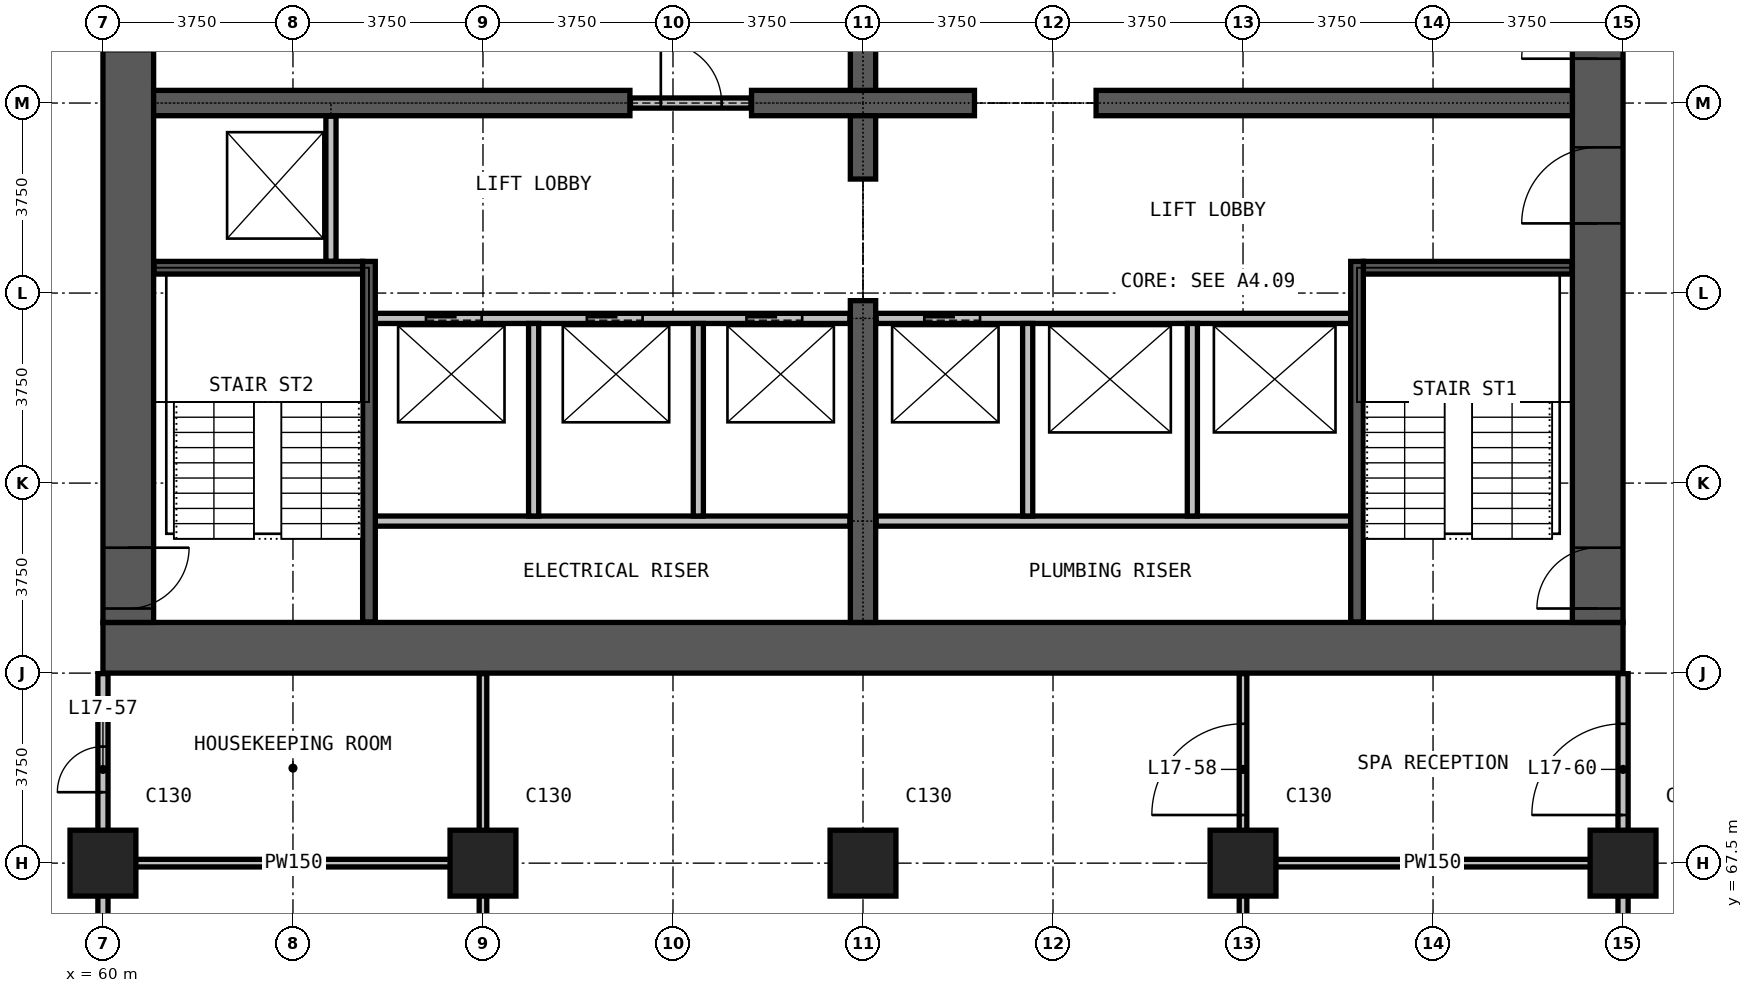
"""IFC4 building model, lengths in metres.
Left out: names, types, materials, properties, quantities, classifications, styles, units other than length and angle.
Written with IfcOpenShell. Run it as: python <this file> out.ifc"""

import sys

from ifc_helpers import new_model, si_unit, direction, frame, frame_2d, origin, origin_2d, place, context, subcontext, project, spatial, rectangle, extrude, element, fill, save


model = new_model("IFC4")
c1 = context("Model", 3, precision=1e-05, world=origin(), true_north=direction((0.0, 1.0)))
c2 = subcontext(c1, "Body", "Model", "MODEL_VIEW")
j1 = project(units=[si_unit("LENGTHUNIT", "METRE"), si_unit("PLANEANGLEUNIT", "RADIAN")], contexts=[c1])
p1 = place(None, origin())
s1 = spatial("IfcSite", under=j1, at=p1, CompositionType="ELEMENT")
p2 = place(p1, origin())
s2 = spatial("IfcBuilding", under=s1, at=p2, CompositionType="ELEMENT")
p3 = place(p2, frame((0.0, 0.0, 75.8)))
s3 = spatial("IfcBuildingStorey", under=s2, at=p3, CompositionType="ELEMENT", Elevation=75.8)
for number, where, z_axis, x_axis in (
    (1, (60.0, 67.5, 0.0), (0.0, 0.0, 1.0), (1.0, 0.0, 0.0)),
    (2, (67.5, 67.5, 0.0), (0.0, 0.0, 1.0), (1.0, 0.0, 0.0)),
    (3, (75.0, 67.5, 0.0), (0.0, 0.0, 1.0), (1.0, 0.0, 0.0)),
    (4, (82.5, 67.5, 0.0), (0.0, 0.0, 1.0), (1.0, 0.0, 0.0)),
    (5, (90.0, 67.5, 0.0), (0.0, 0.0, 1.0), (1.0, 0.0, 0.0)),
):
    element("IfcColumn", number, at=place(p3, frame(where, z_axis=z_axis, x_axis=x_axis)), inside=s3, PredefinedType="COLUMN", context=c2, shape_type="SweptSolid", body=[
        extrude(rectangle(XDim=1.3, YDim=1.3, at=origin_2d()), origin(), (0.0, 0.0, 1.0), 3.3),
    ])
p4 = place(p3, frame((60.0, 71.75, 0.0), z_axis=(0.0, 0.0, 1.0), x_axis=(1.0, 0.0, 0.0)))
e6 = element("IfcWall", 6, at=p4, inside=s3, PredefinedType="SHEAR", context=c2, shape_type="SweptSolid", body=[
    extrude(rectangle(XDim=30.0, YDim=1.0, at=frame_2d((15.0, 0.0))), origin(), (0.0, 0.0, 1.0), 3.3),
])
p5 = place(p3, frame((89.5, 72.25, 0.0), z_axis=(0.0, 0.0, 1.0), x_axis=(0.0, 1.0, 0.0)))
e7 = element("IfcWall", 7, at=p5, inside=s3, PredefinedType="SHEAR", context=c2, shape_type="SweptSolid", body=[
    extrude(rectangle(XDim=20.5, YDim=1.0, at=frame_2d((10.25, 0.0))), origin(), (0.0, 0.0, 1.0), 3.3),
])
p6 = place(p5, frame((0.275, 0.0, 0.0)))
e8 = element("IfcOpeningElement", 8, at=p6, cuts=e7, PredefinedType="OPENING", context=c2, shape_type="SweptSolid", body=[
    extrude(rectangle(XDim=1.2, YDim=2.2, at=frame_2d((0.6, 1.1))), frame((0.0, 0.51, 0.0), z_axis=(0.0, -1.0, 0.0), x_axis=(1.0, 0.0, 0.0)), (0.0, 0.0, 1.0), 1.02),
])
p7 = place(p5, frame((13.775, 0.0, 0.0)))
e9 = element("IfcOpeningElement", 9, at=p7, cuts=e7, PredefinedType="OPENING", context=c2, shape_type="SweptSolid", body=[
    extrude(rectangle(XDim=1.2, YDim=2.2, at=frame_2d((0.6, 1.1))), frame((0.0, 0.51, 0.0), z_axis=(0.0, -1.0, 0.0), x_axis=(1.0, 0.0, 0.0)), (0.0, 0.0, 1.0), 1.02),
])
p8 = place(p5, frame((7.875, 0.0, 0.0)))
e10 = element("IfcOpeningElement", 10, at=p8, cuts=e7, PredefinedType="OPENING", context=c2, shape_type="SweptSolid", body=[
    extrude(rectangle(XDim=1.5, YDim=2.2, at=frame_2d((0.75, 1.1))), frame((0.0, 0.51, 0.0), z_axis=(0.0, -1.0, 0.0), x_axis=(1.0, 0.0, 0.0)), (0.0, 0.0, 1.0), 1.02),
])
p9 = place(p5, frame((11.125, 0.0, 0.0)))
e11 = element("IfcOpeningElement", 11, at=p9, cuts=e7, PredefinedType="OPENING", context=c2, shape_type="SweptSolid", body=[
    extrude(rectangle(XDim=1.5, YDim=2.2, at=frame_2d((0.75, 1.1))), frame((0.0, 0.51, 0.0), z_axis=(0.0, -1.0, 0.0), x_axis=(1.0, 0.0, 0.0)), (0.0, 0.0, 1.0), 1.02),
])
p10 = place(p3, frame((60.5, 92.75, 0.0), z_axis=(0.0, 0.0, 1.0), x_axis=(0.0, -1.0, 0.0)))
e12 = element("IfcWall", 12, at=p10, inside=s3, PredefinedType="SHEAR", context=c2, shape_type="SweptSolid", body=[
    extrude(rectangle(XDim=20.5, YDim=1.0, at=frame_2d((10.25, 0.0))), origin(), (0.0, 0.0, 1.0), 3.3),
])
p11 = place(p10, frame((19.025, 0.0, 0.0)))
e13 = element("IfcOpeningElement", 13, at=p11, cuts=e12, PredefinedType="OPENING", context=c2, shape_type="SweptSolid", body=[
    extrude(rectangle(XDim=1.2, YDim=2.2, at=frame_2d((0.6, 1.1))), frame((0.0, 0.51, 0.0), z_axis=(0.0, -1.0, 0.0), x_axis=(1.0, 0.0, 0.0)), (0.0, 0.0, 1.0), 1.02),
])
p12 = place(p10, frame((8.025, 0.0, 0.0)))
e14 = element("IfcOpeningElement", 14, at=p12, cuts=e12, PredefinedType="OPENING", context=c2, shape_type="SweptSolid", body=[
    extrude(rectangle(XDim=1.2, YDim=2.2, at=frame_2d((0.6, 1.1))), frame((0.0, 0.51, 0.0), z_axis=(0.0, -1.0, 0.0), x_axis=(1.0, 0.0, 0.0)), (0.0, 0.0, 1.0), 1.02),
])
p13 = place(p3, frame((61.0, 82.5, 0.0), z_axis=(0.0, 0.0, 1.0), x_axis=(1.0, 0.0, 0.0)))
e15 = element("IfcWall", 15, at=p13, inside=s3, PredefinedType="SHEAR", context=c2, shape_type="SweptSolid", body=[
    extrude(rectangle(XDim=9.4, YDim=0.5, at=frame_2d((4.7, 0.0))), origin(), (0.0, 0.0, 1.0), 3.3),
])
p14 = place(p3, frame((72.8, 82.5, 0.0), z_axis=(0.0, 0.0, 1.0), x_axis=(1.0, 0.0, 0.0)))
e16 = element("IfcWall", 16, at=p14, inside=s3, PredefinedType="SHEAR", context=c2, shape_type="SweptSolid", body=[
    extrude(rectangle(XDim=4.4, YDim=0.5, at=frame_2d((2.2, 0.0))), origin(), (0.0, 0.0, 1.0), 3.3),
])
p15 = place(p3, frame((79.6, 82.5, 0.0), z_axis=(0.0, 0.0, 1.0), x_axis=(1.0, 0.0, 0.0)))
e17 = element("IfcWall", 17, at=p15, inside=s3, PredefinedType="SHEAR", context=c2, shape_type="SweptSolid", body=[
    extrude(rectangle(XDim=9.4, YDim=0.5, at=frame_2d((4.7, 0.0))), origin(), (0.0, 0.0, 1.0), 3.3),
])
p16 = place(p3, frame((75.0, 72.25, 0.0), z_axis=(0.0, 0.0, 1.0), x_axis=(0.0, 1.0, 0.0)))
e18 = element("IfcWall", 18, at=p16, inside=s3, PredefinedType="SHEAR", context=c2, shape_type="SweptSolid", body=[
    extrude(rectangle(XDim=6.35, YDim=0.5, at=frame_2d((3.175, 0.0))), origin(), (0.0, 0.0, 1.0), 3.3),
])
for number, where, z_axis, x_axis in (
    (19, (75.0, 81.0, 0.0), (0.0, 0.0, 1.0), (0.0, 1.0, 0.0)),
    (20, (75.0, 82.75, 0.0), (0.0, 0.0, 1.0), (0.0, 1.0, 0.0)),
):
    element("IfcWall", number, at=place(p3, frame(where, z_axis=z_axis, x_axis=x_axis)), inside=s3, PredefinedType="SHEAR", context=c2, shape_type="SweptSolid", body=[
        extrude(rectangle(XDim=1.25, YDim=0.5, at=frame_2d((0.625, 0.0))), origin(), (0.0, 0.0, 1.0), 3.3),
    ])
p17 = place(p3, frame((70.41, 82.5, 0.0), z_axis=(0.0, 0.0, 1.0), x_axis=(1.0, 0.0, 0.0)))
e21 = element("IfcWall", 21, at=p17, inside=s3, PredefinedType="PARTITIONING", context=c2, shape_type="SweptSolid", body=[
    extrude(rectangle(XDim=2.38, YDim=0.2, at=frame_2d((1.19, 0.0))), origin(), (0.0, 0.0, 1.0), 2.4),
])
p18 = place(p17, frame((0.6, 0.0, 0.0)))
e22 = element("IfcOpeningElement", 22, at=p18, cuts=e21, PredefinedType="OPENING", context=c2, shape_type="SweptSolid", body=[
    extrude(rectangle(XDim=1.2, YDim=2.2, at=frame_2d((0.6, 1.1))), frame((0.0, 0.11, 0.0), z_axis=(0.0, -1.0, 0.0), x_axis=(1.0, 0.0, 0.0)), (0.0, 0.0, 1.0), 0.22),
])
p19 = place(p3, frame((60.0, 52.4, 0.0), z_axis=(0.0, 0.0, 1.0), x_axis=(0.0, 1.0, 0.0)))
e23 = element("IfcWall", 23, at=p19, inside=s3, PredefinedType="PARTITIONING", context=c2, shape_type="SweptSolid", body=[
    extrude(rectangle(XDim=18.84, YDim=0.2, at=frame_2d((9.42, 0.0))), origin(), (0.0, 0.0, 1.0), 3.0),
])
p20 = place(p19, frame((10.9, 0.0, 0.0)))
e24 = element("IfcOpeningElement", 24, at=p20, cuts=e23, PredefinedType="OPENING", context=c2, shape_type="SweptSolid", body=[
    extrude(rectangle(XDim=0.9, YDim=2.2, at=frame_2d((0.45, 1.1))), frame((0.0, 0.11, 0.0), z_axis=(0.0, -1.0, 0.0), x_axis=(1.0, 0.0, 0.0)), (0.0, 0.0, 1.0), 0.22),
])
p21 = place(p19, frame((16.5, 0.0, 0.0)))
e25 = element("IfcOpeningElement", 25, at=p21, cuts=e23, PredefinedType="OPENING", context=c2, shape_type="SweptSolid", body=[
    extrude(rectangle(XDim=0.9, YDim=2.2, at=frame_2d((0.45, 1.1))), frame((0.0, 0.11, 0.0), z_axis=(0.0, -1.0, 0.0), x_axis=(1.0, 0.0, 0.0)), (0.0, 0.0, 1.0), 0.22),
])
p22 = place(p3, frame((90.0, 52.4, 0.0), z_axis=(0.0, 0.0, 1.0), x_axis=(0.0, 1.0, 0.0)))
e26 = element("IfcWall", 26, at=p22, inside=s3, PredefinedType="PARTITIONING", context=c2, shape_type="SweptSolid", body=[
    extrude(rectangle(XDim=18.84, YDim=0.2, at=frame_2d((9.42, 0.0))), origin(), (0.0, 0.0, 1.0), 3.0),
])
p23 = place(p22, frame((3.35, 0.0, 0.0)))
e27 = element("IfcOpeningElement", 27, at=p23, cuts=e26, PredefinedType="OPENING", context=c2, shape_type="SweptSolid", body=[
    extrude(rectangle(XDim=1.0, YDim=2.2, at=frame_2d((0.5, 1.1))), frame((0.0, 0.11, 0.0), z_axis=(0.0, -1.0, 0.0), x_axis=(1.0, 0.0, 0.0)), (0.0, 0.0, 1.0), 0.22),
])
p24 = place(p22, frame((10.85, 0.0, 0.0)))
e28 = element("IfcOpeningElement", 28, at=p24, cuts=e26, PredefinedType="OPENING", context=c2, shape_type="SweptSolid", body=[
    extrude(rectangle(XDim=1.0, YDim=2.2, at=frame_2d((0.5, 1.1))), frame((0.0, 0.11, 0.0), z_axis=(0.0, -1.0, 0.0), x_axis=(1.0, 0.0, 0.0)), (0.0, 0.0, 1.0), 0.22),
])
p25 = place(p22, frame((16.05, 0.0, 0.0)))
e29 = element("IfcOpeningElement", 29, at=p25, cuts=e26, PredefinedType="OPENING", context=c2, shape_type="SweptSolid", body=[
    extrude(rectangle(XDim=1.8, YDim=2.2, at=frame_2d((0.9, 1.1))), frame((0.0, 0.11, 0.0), z_axis=(0.0, -1.0, 0.0), x_axis=(1.0, 0.0, 0.0)), (0.0, 0.0, 1.0), 0.22),
])
for number, where, z_axis, x_axis in (
    (30, (60.1, 67.5, 0.0), (0.0, 0.0, 1.0), (1.0, 0.0, 0.0)),
    (31, (82.575, 67.5, 0.0), (0.0, 0.0, 1.0), (1.0, 0.0, 0.0)),
):
    element("IfcWall", number, at=place(p3, frame(where, z_axis=z_axis, x_axis=x_axis)), inside=s3, PredefinedType="PARTITIONING", context=c2, shape_type="SweptSolid", body=[
        extrude(rectangle(XDim=7.325, YDim=0.15, at=frame_2d((3.663, 0.0))), origin(), (0.0, 0.0, 1.0), 3.0),
    ])
p26 = place(p3, frame((67.5, 60.075, 0.0), z_axis=(0.0, 0.0, 1.0), x_axis=(0.0, 1.0, 0.0)))
e32 = element("IfcWall", 32, at=p26, inside=s3, PredefinedType="PARTITIONING", context=c2, shape_type="SweptSolid", body=[
    extrude(rectangle(XDim=11.165, YDim=0.15, at=frame_2d((5.583, 0.0))), origin(), (0.0, 0.0, 1.0), 3.0),
])
p27 = place(p3, frame((82.5, 60.075, 0.0), z_axis=(0.0, 0.0, 1.0), x_axis=(0.0, 1.0, 0.0)))
e33 = element("IfcWall", 33, at=p27, inside=s3, PredefinedType="PARTITIONING", context=c2, shape_type="SweptSolid", body=[
    extrude(rectangle(XDim=11.165, YDim=0.15, at=frame_2d((5.583, 0.0))), origin(), (0.0, 0.0, 1.0), 3.0),
])
p28 = place(p27, frame((8.375, 0.0, 0.0)))
e34 = element("IfcOpeningElement", 34, at=p28, cuts=e33, PredefinedType="OPENING", context=c2, shape_type="SweptSolid", body=[
    extrude(rectangle(XDim=1.8, YDim=2.2, at=frame_2d((0.9, 1.1))), frame((0.0, 0.085, 0.0), z_axis=(0.0, -1.0, 0.0), x_axis=(1.0, 0.0, 0.0)), (0.0, 0.0, 1.0), 0.17),
])
for number, where, z_axis, x_axis in (
    (35, (65.375, 74.25, 0.0), (0.0, 0.0, 1.0), (1.0, 0.0, 0.0)),
    (36, (75.26, 74.25, 0.0), (0.0, 0.0, 1.0), (1.0, 0.0, 0.0)),
):
    element("IfcWall", number, at=place(p3, frame(where, z_axis=z_axis, x_axis=x_axis)), inside=s3, PredefinedType="PARTITIONING", context=c2, shape_type="SweptSolid", body=[
        extrude(rectangle(XDim=9.365, YDim=0.2, at=frame_2d((4.683, 0.0))), origin(), (0.0, 0.0, 1.0), 3.0),
    ])
p29 = place(p3, frame((65.375, 78.25, 0.0), z_axis=(0.0, 0.0, 1.0), x_axis=(1.0, 0.0, 0.0)))
e37 = element("IfcWall", 37, at=p29, inside=s3, PredefinedType="PARTITIONING", context=c2, shape_type="SweptSolid", body=[
    extrude(rectangle(XDim=9.365, YDim=0.2, at=frame_2d((4.683, 0.0))), origin(), (0.0, 0.0, 1.0), 3.0),
])
p30 = place(p29, frame((1.0, 0.0, 0.0)))
e38 = element("IfcOpeningElement", 38, at=p30, cuts=e37, PredefinedType="OPENING", context=c2, shape_type="SweptSolid", body=[
    extrude(rectangle(XDim=1.1, YDim=2.2, at=frame_2d((0.55, 1.1))), frame((0.0, 0.11, 0.0), z_axis=(0.0, -1.0, 0.0), x_axis=(1.0, 0.0, 0.0)), (0.0, 0.0, 1.0), 0.22),
])
p31 = place(p29, frame((4.175, 0.0, 0.0)))
e39 = element("IfcOpeningElement", 39, at=p31, cuts=e37, PredefinedType="OPENING", context=c2, shape_type="SweptSolid", body=[
    extrude(rectangle(XDim=1.1, YDim=2.2, at=frame_2d((0.55, 1.1))), frame((0.0, 0.11, 0.0), z_axis=(0.0, -1.0, 0.0), x_axis=(1.0, 0.0, 0.0)), (0.0, 0.0, 1.0), 0.22),
])
p32 = place(p29, frame((7.325, 0.0, 0.0)))
e40 = element("IfcOpeningElement", 40, at=p32, cuts=e37, PredefinedType="OPENING", context=c2, shape_type="SweptSolid", body=[
    extrude(rectangle(XDim=1.1, YDim=2.2, at=frame_2d((0.55, 1.1))), frame((0.0, 0.11, 0.0), z_axis=(0.0, -1.0, 0.0), x_axis=(1.0, 0.0, 0.0)), (0.0, 0.0, 1.0), 0.22),
])
p33 = place(p3, frame((75.26, 78.25, 0.0), z_axis=(0.0, 0.0, 1.0), x_axis=(1.0, 0.0, 0.0)))
e41 = element("IfcWall", 41, at=p33, inside=s3, PredefinedType="PARTITIONING", context=c2, shape_type="SweptSolid", body=[
    extrude(rectangle(XDim=9.365, YDim=0.2, at=frame_2d((4.683, 0.0))), origin(), (0.0, 0.0, 1.0), 3.0),
])
p34 = place(p33, frame((0.95, 0.0, 0.0)))
e42 = element("IfcOpeningElement", 42, at=p34, cuts=e41, PredefinedType="OPENING", context=c2, shape_type="SweptSolid", body=[
    extrude(rectangle(XDim=1.1, YDim=2.2, at=frame_2d((0.55, 1.1))), frame((0.0, 0.11, 0.0), z_axis=(0.0, -1.0, 0.0), x_axis=(1.0, 0.0, 0.0)), (0.0, 0.0, 1.0), 0.22),
])
p35 = place(p3, frame((64.5, 79.375, 0.0), z_axis=(0.0, 0.0, 1.0), x_axis=(0.0, 1.0, 0.0)))
e43 = element("IfcWall", 43, at=p35, inside=s3, PredefinedType="PARTITIONING", context=c2, shape_type="SweptSolid", body=[
    extrude(rectangle(XDim=2.865, YDim=0.2, at=frame_2d((1.433, 0.0))), origin(), (0.0, 0.0, 1.0), 3.0),
])
for number, where, z_axis, x_axis in (
    (44, (68.5, 74.35, 0.0), (0.0, 0.0, 1.0), (0.0, 1.0, 0.0)),
    (45, (71.75, 74.35, 0.0), (0.0, 0.0, 1.0), (0.0, 1.0, 0.0)),
    (46, (78.25, 74.35, 0.0), (0.0, 0.0, 1.0), (0.0, 1.0, 0.0)),
    (47, (81.5, 74.35, 0.0), (0.0, 0.0, 1.0), (0.0, 1.0, 0.0)),
):
    element("IfcWall", number, at=place(p3, frame(where, z_axis=z_axis, x_axis=x_axis)), inside=s3, PredefinedType="PARTITIONING", context=c2, shape_type="SweptSolid", body=[
        extrude(rectangle(XDim=3.8, YDim=0.2, at=frame_2d((1.9, 0.0))), origin(), (0.0, 0.0, 1.0), 3.0),
    ])
for number, where, z_axis, x_axis in (
    (48, (61.01, 79.25, 0.0), (0.0, 0.0, 1.0), (1.0, 0.0, 0.0)),
    (49, (84.875, 79.25, 0.0), (0.0, 0.0, 1.0), (1.0, 0.0, 0.0)),
):
    element("IfcWall", number, at=place(p3, frame(where, z_axis=z_axis, x_axis=x_axis)), inside=s3, PredefinedType="PARTITIONING", context=c2, shape_type="SweptSolid", body=[
        extrude(rectangle(XDim=4.115, YDim=0.25, at=frame_2d((2.058, 0.0))), origin(), (0.0, 0.0, 1.0), 3.0),
    ])
for number, where, z_axis, x_axis in (
    (50, (65.25, 72.26, 0.0), (0.0, 0.0, 1.0), (0.0, 1.0, 0.0)),
    (51, (84.75, 72.26, 0.0), (0.0, 0.0, 1.0), (0.0, 1.0, 0.0)),
):
    element("IfcWall", number, at=place(p3, frame(where, z_axis=z_axis, x_axis=x_axis)), inside=s3, PredefinedType="PARTITIONING", context=c2, shape_type="SweptSolid", body=[
        extrude(rectangle(XDim=7.115, YDim=0.25, at=frame_2d((3.558, 0.0))), origin(), (0.0, 0.0, 1.0), 3.0),
    ])
p36 = place(p30, origin())
e52 = element("IfcDoor", 52, at=p36, inside=s3, OperationType="DOUBLE_DOOR_SLIDING", PredefinedType="DOOR", context=c2, shape_type="SweptSolid", body=[
    extrude(rectangle(XDim=1.1, YDim=2.2, at=frame_2d((0.55, 1.1))), frame((0.0, 0.025, 0.0), z_axis=(0.0, -1.0, 0.0), x_axis=(1.0, 0.0, 0.0)), (0.0, 0.0, 1.0), 0.05),
])
fill(e38, e52)
p37 = place(p31, origin())
e53 = element("IfcDoor", 53, at=p37, inside=s3, OperationType="DOUBLE_DOOR_SLIDING", PredefinedType="DOOR", context=c2, shape_type="SweptSolid", body=[
    extrude(rectangle(XDim=1.1, YDim=2.2, at=frame_2d((0.55, 1.1))), frame((0.0, 0.025, 0.0), z_axis=(0.0, -1.0, 0.0), x_axis=(1.0, 0.0, 0.0)), (0.0, 0.0, 1.0), 0.05),
])
fill(e39, e53)
p38 = place(p32, origin())
e54 = element("IfcDoor", 54, at=p38, inside=s3, OperationType="DOUBLE_DOOR_SLIDING", PredefinedType="DOOR", context=c2, shape_type="SweptSolid", body=[
    extrude(rectangle(XDim=1.1, YDim=2.2, at=frame_2d((0.55, 1.1))), frame((0.0, 0.025, 0.0), z_axis=(0.0, -1.0, 0.0), x_axis=(1.0, 0.0, 0.0)), (0.0, 0.0, 1.0), 0.05),
])
fill(e40, e54)
p39 = place(p34, origin())
e55 = element("IfcDoor", 55, at=p39, inside=s3, OperationType="DOUBLE_DOOR_SLIDING", PredefinedType="DOOR", context=c2, shape_type="SweptSolid", body=[
    extrude(rectangle(XDim=1.1, YDim=2.2, at=frame_2d((0.55, 1.1))), frame((0.0, 0.025, 0.0), z_axis=(0.0, -1.0, 0.0), x_axis=(1.0, 0.0, 0.0)), (0.0, 0.0, 1.0), 0.05),
])
fill(e42, e55)
p40 = place(p18, origin())
e56 = element("IfcDoor", 56, at=p40, inside=s3, OperationType="SINGLE_SWING_LEFT", PredefinedType="DOOR", context=c2, shape_type="SweptSolid", body=[
    extrude(rectangle(XDim=1.2, YDim=2.2, at=frame_2d((0.6, 1.1))), frame((0.0, 0.025, 0.0), z_axis=(0.0, -1.0, 0.0), x_axis=(1.0, 0.0, 0.0)), (0.0, 0.0, 1.0), 0.05),
])
fill(e22, e56)
p41 = place(p6, origin())
e57 = element("IfcDoor", 57, at=p41, inside=s3, OperationType="SINGLE_SWING_RIGHT", PredefinedType="DOOR", context=c2, shape_type="SweptSolid", body=[
    extrude(rectangle(XDim=1.2, YDim=2.2, at=frame_2d((0.6, 1.1))), frame((0.0, 0.025, 0.0), z_axis=(0.0, -1.0, 0.0), x_axis=(1.0, 0.0, 0.0)), (0.0, 0.0, 1.0), 0.05),
])
fill(e8, e57)
p42 = place(p11, origin())
e58 = element("IfcDoor", 58, at=p42, inside=s3, OperationType="SINGLE_SWING_RIGHT", PredefinedType="DOOR", context=c2, shape_type="SweptSolid", body=[
    extrude(rectangle(XDim=1.2, YDim=2.2, at=frame_2d((0.6, 1.1))), frame((0.0, 0.025, 0.0), z_axis=(0.0, -1.0, 0.0), x_axis=(1.0, 0.0, 0.0)), (0.0, 0.0, 1.0), 0.05),
])
fill(e13, e58)
p43 = place(p8, origin())
e59 = element("IfcDoor", 59, at=p43, inside=s3, OperationType="DOUBLE_DOOR_SINGLE_SWING", PredefinedType="DOOR", context=c2, shape_type="SweptSolid", body=[
    extrude(rectangle(XDim=1.5, YDim=2.2, at=frame_2d((0.75, 1.1))), frame((0.0, 0.025, 0.0), z_axis=(0.0, -1.0, 0.0), x_axis=(1.0, 0.0, 0.0)), (0.0, 0.0, 1.0), 0.05),
])
fill(e10, e59)
p44 = place(p9, origin())
e60 = element("IfcDoor", 60, at=p44, inside=s3, OperationType="DOUBLE_DOOR_SINGLE_SWING", PredefinedType="DOOR", context=c2, shape_type="SweptSolid", body=[
    extrude(rectangle(XDim=1.5, YDim=2.2, at=frame_2d((0.75, 1.1))), frame((0.0, 0.025, 0.0), z_axis=(0.0, -1.0, 0.0), x_axis=(1.0, 0.0, 0.0)), (0.0, 0.0, 1.0), 0.05),
])
fill(e11, e60)
p45 = place(p21, origin())
e61 = element("IfcDoor", 61, at=p45, inside=s3, OperationType="SINGLE_SWING_RIGHT", PredefinedType="DOOR", context=c2, shape_type="SweptSolid", body=[
    extrude(rectangle(XDim=0.9, YDim=2.2, at=frame_2d((0.45, 1.1))), frame((0.0, 0.025, 0.0), z_axis=(0.0, -1.0, 0.0), x_axis=(1.0, 0.0, 0.0)), (0.0, 0.0, 1.0), 0.05),
])
fill(e25, e61)
p46 = place(p28, origin())
e62 = element("IfcDoor", 62, at=p46, inside=s3, OperationType="DOUBLE_DOOR_SINGLE_SWING", PredefinedType="DOOR", context=c2, shape_type="SweptSolid", body=[
    extrude(rectangle(XDim=1.8, YDim=2.2, at=frame_2d((0.9, 1.1))), frame((0.0, 0.025, 0.0), z_axis=(0.0, -1.0, 0.0), x_axis=(1.0, 0.0, 0.0)), (0.0, 0.0, 1.0), 0.05),
])
fill(e34, e62)
p47 = place(p25, origin())
e63 = element("IfcDoor", 63, at=p47, inside=s3, OperationType="DOUBLE_DOOR_SINGLE_SWING", PredefinedType="DOOR", context=c2, shape_type="SweptSolid", body=[
    extrude(rectangle(XDim=1.8, YDim=2.2, at=frame_2d((0.9, 1.1))), frame((0.0, 0.025, 0.0), z_axis=(0.0, -1.0, 0.0), x_axis=(1.0, 0.0, 0.0)), (0.0, 0.0, 1.0), 0.05),
])
fill(e29, e63)
save(model, sys.argv[1])
